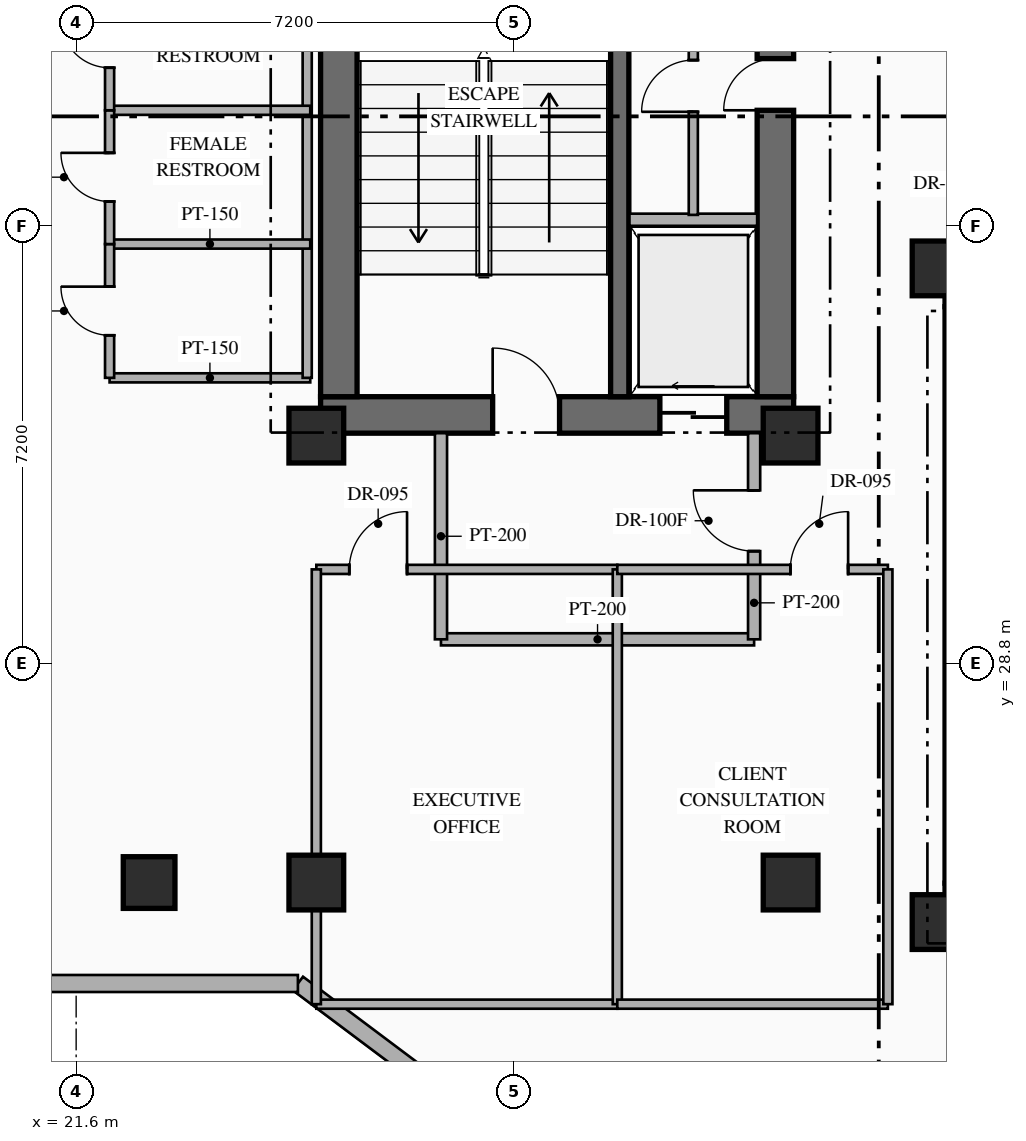
"""IFC4 building model, lengths in metres.
Left out: names, types, materials, properties, quantities, classifications, styles, units other than length and angle.
Written with IfcOpenShell. Run it as: python <this file> out.ifc"""

import sys

from ifc_helpers import new_model, si_unit, direction, frame, frame_2d, origin, origin_2d, place, context, subcontext, project, spatial, rectangle, hollow_rectangle, extrude, element, fill, save


model = new_model("IFC4")
c1 = context("Model", 3, precision=1e-05, world=origin(), true_north=direction((0.0, 1.0)))
c2 = subcontext(c1, "Body", "Model", "MODEL_VIEW")
j1 = project(units=[si_unit("LENGTHUNIT", "METRE"), si_unit("PLANEANGLEUNIT", "RADIAN")], contexts=[c1])
p1 = place(None, origin())
s1 = spatial("IfcSite", under=j1, at=p1, CompositionType="ELEMENT")
p2 = place(p1, origin())
s2 = spatial("IfcBuilding", under=s1, at=p2, CompositionType="ELEMENT")
p3 = place(p2, frame((0.0, 0.0, 119.25)))
s3 = spatial("IfcBuildingStorey", under=s2, at=p3, CompositionType="ELEMENT", Elevation=119.25)
p4 = place(p3, frame((25.62, 32.89, 0.0), z_axis=(0.0, 0.0, 1.0), x_axis=(1.0, 0.0, 0.0)))
e1 = element("IfcWall", 1, at=p4, inside=s3, PredefinedType="SHEAR", context=c2, shape_type="SweptSolid", body=[
    extrude(rectangle(XDim=7.78, YDim=0.6, at=frame_2d((3.89, 0.0))), origin(), (0.0, 0.0, 1.0), 3.6),
])
p5 = place(p4, frame((2.83, 0.0, 0.0)))
e2 = element("IfcOpeningElement", 2, at=p5, cuts=e1, PredefinedType="OPENING", context=c2, shape_type="SweptSolid", body=[
    extrude(rectangle(XDim=1.1, YDim=2.2, at=frame_2d((0.55, 1.1))), frame((0.0, 0.31, 0.0), z_axis=(0.0, -1.0, 0.0), x_axis=(1.0, 0.0, 0.0)), (0.0, 0.0, 1.0), 0.62),
])
p6 = place(p4, frame((5.58, 0.0, 0.0)))
e3 = element("IfcOpeningElement", 3, at=p6, cuts=e1, PredefinedType="OPENING", context=c2, shape_type="SweptSolid", body=[
    extrude(rectangle(XDim=1.1, YDim=2.15, at=frame_2d((0.55, 1.075))), frame((0.0, 0.31, 0.0), z_axis=(0.0, -1.0, 0.0), x_axis=(1.0, 0.0, 0.0)), (0.0, 0.0, 1.0), 0.62),
])
p7 = place(p3, frame((25.92, 33.19, 0.0), z_axis=(0.0, 0.0, 1.0), x_axis=(0.0, 1.0, 0.0)))
e4 = element("IfcWall", 4, at=p7, inside=s3, PredefinedType="SHEAR", context=c2, shape_type="SweptSolid", body=[
    extrude(rectangle(XDim=9.48, YDim=0.6, at=frame_2d((4.74, 0.0))), origin(), (0.0, 0.0, 1.0), 3.6),
])
p8 = place(p3, frame((33.1, 33.19, 0.0), z_axis=(0.0, 0.0, 1.0), x_axis=(0.0, 1.0, 0.0)))
e5 = element("IfcWall", 5, at=p8, inside=s3, PredefinedType="SHEAR", context=c2, shape_type="SweptSolid", body=[
    extrude(rectangle(XDim=9.48, YDim=0.6, at=frame_2d((4.74, 0.0))), origin(), (0.0, 0.0, 1.0), 3.6),
])
p9 = place(p8, frame((4.71, 0.0, 0.0)))
e6 = element("IfcOpeningElement", 6, at=p9, cuts=e5, PredefinedType="OPENING", context=c2, shape_type="SweptSolid", body=[
    extrude(rectangle(XDim=0.85, YDim=2.08, at=frame_2d((0.425, 1.04))), frame((0.0, 0.31, 0.0), z_axis=(0.0, -1.0, 0.0), x_axis=(1.0, 0.0, 0.0)), (0.0, 0.0, 1.0), 0.62),
])
p10 = place(p8, frame((7.76, 0.0, 0.0)))
e7 = element("IfcOpeningElement", 7, at=p10, cuts=e5, PredefinedType="OPENING", context=c2, shape_type="SweptSolid", body=[
    extrude(rectangle(XDim=0.85, YDim=2.08, at=frame_2d((0.425, 1.04))), frame((0.0, 0.31, 0.0), z_axis=(0.0, -1.0, 0.0), x_axis=(1.0, 0.0, 0.0)), (0.0, 0.0, 1.0), 0.62),
])
p11 = place(p3, frame((30.54, 33.19, 0.0), z_axis=(0.0, 0.0, 1.0), x_axis=(0.0, 1.0, 0.0)))
e8 = element("IfcWall", 8, at=p11, inside=s3, PredefinedType="SHEAR", context=c2, shape_type="SweptSolid", body=[
    extrude(rectangle(XDim=9.48, YDim=0.3, at=frame_2d((4.74, 0.0))), origin(), (0.0, 0.0, 1.0), 3.6),
])
p12 = place(p3, frame((35.89, 24.89, 0.0), z_axis=(0.0, 0.0, 1.0), x_axis=(1.0, 0.0, 0.0)))
e9 = element("IfcWall", 9, at=p12, inside=s3, PredefinedType="SHEAR", context=c2, shape_type="SweptSolid", body=[
    extrude(rectangle(XDim=7.76, YDim=0.6, at=frame_2d((3.88, 0.0))), origin(), (0.0, 0.0, 1.0), 3.6),
])
p13 = place(p3, frame((35.89, 34.97, 0.0), z_axis=(0.0, 0.0, 1.0), x_axis=(1.0, 0.0, 0.0)))
e10 = element("IfcWall", 10, at=p13, inside=s3, PredefinedType="SHEAR", context=c2, shape_type="SweptSolid", body=[
    extrude(rectangle(XDim=7.76, YDim=0.6, at=frame_2d((3.88, 0.0))), origin(), (0.0, 0.0, 1.0), 3.6),
])
p14 = place(p13, frame((2.66, 0.0, 0.0)))
e11 = element("IfcOpeningElement", 11, at=p14, cuts=e10, PredefinedType="OPENING", context=c2, shape_type="SweptSolid", body=[
    extrude(rectangle(XDim=1.1, YDim=2.2, at=frame_2d((0.55, 1.1))), frame((0.0, 0.31, 0.0), z_axis=(0.0, -1.0, 0.0), x_axis=(1.0, 0.0, 0.0)), (0.0, 0.0, 1.0), 0.62),
])
p15 = place(p13, frame((5.56, 0.0, 0.0)))
e12 = element("IfcOpeningElement", 12, at=p15, cuts=e10, PredefinedType="OPENING", context=c2, shape_type="SweptSolid", body=[
    extrude(rectangle(XDim=1.12, YDim=2.15, at=frame_2d((0.56, 1.075))), frame((0.0, 0.31, 0.0), z_axis=(0.0, -1.0, 0.0), x_axis=(1.0, 0.0, 0.0)), (0.0, 0.0, 1.0), 0.62),
])
p16 = place(p3, frame((36.19, 25.19, 0.0), z_axis=(0.0, 0.0, 1.0), x_axis=(0.0, 1.0, 0.0)))
e13 = element("IfcWall", 13, at=p16, inside=s3, PredefinedType="SHEAR", context=c2, shape_type="SweptSolid", body=[
    extrude(rectangle(XDim=9.48, YDim=0.6, at=frame_2d((4.74, 0.0))), origin(), (0.0, 0.0, 1.0), 3.6),
])
for number, where, z_axis, x_axis in (
    (14, (25.55, 32.55, 0.0), (0.0, 0.0, 1.0), (1.0, 0.0, 0.0)),
    (15, (33.35, 32.55, 0.0), (0.0, 0.0, 1.0), (1.0, 0.0, 0.0)),
    (16, (35.8, 24.55, 0.0), (0.0, 0.0, 1.0), (1.0, 0.0, 0.0)),
    (17, (35.8, 35.3, 0.0), (0.0, 0.0, 1.0), (1.0, 0.0, 0.0)),
):
    element("IfcColumn", number, at=place(p3, frame(where, z_axis=z_axis, x_axis=x_axis)), inside=s3, PredefinedType="COLUMN", context=c2, shape_type="SweptSolid", body=[
        extrude(rectangle(XDim=0.9, YDim=0.9, at=origin_2d()), origin(), (0.0, 0.0, 1.0), 3.6),
    ])
for number, where, z_axis, x_axis in (
    (18, (25.55, 25.2, 0.0), (0.0, 0.0, 1.0), (1.0, 0.0, 0.0)),
    (19, (33.35, 25.2, 0.0), (0.0, 0.0, 1.0), (1.0, 0.0, 0.0)),
):
    element("IfcColumn", number, at=place(p3, frame(where, z_axis=z_axis, x_axis=x_axis)), inside=s3, PredefinedType="COLUMN", context=c2, shape_type="SweptSolid", body=[
        extrude(hollow_rectangle(XDim=0.9, YDim=0.9, WallThickness=0.036, at=origin_2d()), origin(), (0.0, 0.0, 1.0), 3.6),
    ])
p17 = place(p3, frame((22.8, 25.2, 0.0), z_axis=(0.0, 0.0, 1.0), x_axis=(1.0, 0.0, 0.0)))
e20 = element("IfcColumn", 20, at=p17, inside=s3, PredefinedType="COLUMN", context=c2, shape_type="SweptSolid", body=[
    extrude(hollow_rectangle(XDim=0.85, YDim=0.85, WallThickness=0.032, at=origin_2d()), origin(), (0.0, 0.0, 1.0), 3.6),
])
p18 = place(p3, frame((53.318, 2.487, 0.0), z_axis=(0.0, 0.0, 1.0), x_axis=(-0.800004174678, 0.599994433723, 0.0)))
e21 = element("IfcWall", 21, at=p18, inside=s3, PredefinedType="STANDARD", context=c2, shape_type="SweptSolid", body=[
    extrude(rectangle(XDim=35.089, YDim=0.28, at=frame_2d((17.544, 0.0))), origin(), (0.0, 0.0, 1.0), 3.35),
])
p19 = place(p3, frame((25.247, 23.54, 0.0), z_axis=(0.0, 0.0, 1.0), x_axis=(-1.0, 0.0, 0.0)))
e22 = element("IfcWall", 22, at=p19, inside=s3, PredefinedType="STANDARD", context=c2, shape_type="SweptSolid", body=[
    extrude(rectangle(XDim=6.747, YDim=0.28, at=frame_2d((3.374, 0.0))), origin(), (0.0, 0.0, 1.0), 3.35),
])
p20 = place(p3, frame((30.7, 36.1, 0.0), z_axis=(0.0, 0.0, 1.0), x_axis=(1.0, 0.0, 0.0)))
e23 = element("IfcWall", 23, at=p20, inside=s3, PredefinedType="STANDARD", context=c2, shape_type="SweptSolid", body=[
    extrude(rectangle(XDim=2.1, YDim=0.2, at=frame_2d((1.05, 0.0))), origin(), (0.0, 0.0, 1.0), 3.35),
])
p21 = place(p3, frame((31.75, 36.18, 0.0), z_axis=(0.0, 0.0, 1.0), x_axis=(0.0, 1.0, 0.0)))
e24 = element("IfcWall", 24, at=p21, inside=s3, PredefinedType="PARTITIONING", context=c2, shape_type="SweptSolid", body=[
    extrude(rectangle(XDim=4.24, YDim=0.15, at=frame_2d((2.12, 0.0))), origin(), (0.0, 0.0, 1.0), 3.35),
])
p22 = place(p21, frame((1.695, 0.0, 0.0)))
e25 = element("IfcOpeningElement", 25, at=p22, cuts=e24, PredefinedType="OPENING", context=c2, shape_type="SweptSolid", body=[
    extrude(rectangle(XDim=0.85, YDim=2.08, at=frame_2d((0.425, 1.04))), frame((0.0, 0.085, 0.0), z_axis=(0.0, -1.0, 0.0), x_axis=(1.0, 0.0, 0.0)), (0.0, 0.0, 1.0), 0.17),
])
p23 = place(p3, frame((27.6, 29.2, 0.0), z_axis=(0.0, 0.0, 1.0), x_axis=(1.0, 0.0, 0.0)))
e26 = element("IfcWall", 26, at=p23, inside=s3, PredefinedType="STANDARD", context=c2, shape_type="SweptSolid", body=[
    extrude(rectangle(XDim=5.15, YDim=0.2, at=frame_2d((2.575, 0.0))), origin(), (0.0, 0.0, 1.0), 3.35),
])
p24 = place(p3, frame((27.6, 29.2, 0.0), z_axis=(0.0, 0.0, 1.0), x_axis=(0.0, 1.0, 0.0)))
e27 = element("IfcWall", 27, at=p24, inside=s3, PredefinedType="STANDARD", context=c2, shape_type="SweptSolid", body=[
    extrude(rectangle(XDim=3.39, YDim=0.2, at=frame_2d((1.695, 0.0))), origin(), (0.0, 0.0, 1.0), 3.35),
])
p25 = place(p3, frame((32.75, 29.2, 0.0), z_axis=(0.0, 0.0, 1.0), x_axis=(0.0, 1.0, 0.0)))
e28 = element("IfcWall", 28, at=p25, inside=s3, PredefinedType="STANDARD", context=c2, shape_type="SweptSolid", body=[
    extrude(rectangle(XDim=3.39, YDim=0.2, at=frame_2d((1.695, 0.0))), origin(), (0.0, 0.0, 1.0), 3.35),
])
p26 = place(p25, frame((1.45, 0.0, 0.0)))
e29 = element("IfcOpeningElement", 29, at=p26, cuts=e28, PredefinedType="OPENING", context=c2, shape_type="SweptSolid", body=[
    extrude(rectangle(XDim=1.0, YDim=2.2, at=frame_2d((0.5, 1.1))), frame((0.0, 0.11, 0.0), z_axis=(0.0, -1.0, 0.0), x_axis=(1.0, 0.0, 0.0)), (0.0, 0.0, 1.0), 0.22),
])
p27 = place(p3, frame((22.15, 33.5, 0.0), z_axis=(0.0, 0.0, 1.0), x_axis=(1.0, 0.0, 0.0)))
e30 = element("IfcWall", 30, at=p27, inside=s3, PredefinedType="PARTITIONING", context=c2, shape_type="SweptSolid", body=[
    extrude(rectangle(XDim=3.3, YDim=0.15, at=frame_2d((1.65, 0.0))), origin(), (0.0, 0.0, 1.0), 3.35),
])
p28 = place(p3, frame((25.4, 33.5, 0.0), z_axis=(0.0, 0.0, 1.0), x_axis=(0.0, 1.0, 0.0)))
e31 = element("IfcWall", 31, at=p28, inside=s3, PredefinedType="PARTITIONING", context=c2, shape_type="SweptSolid", body=[
    extrude(rectangle(XDim=6.6, YDim=0.15, at=frame_2d((3.3, 0.0))), origin(), (0.0, 0.0, 1.0), 3.35),
])
for number, where, z_axis, x_axis in (
    (32, (22.15, 35.7, 0.0), (0.0, 0.0, 1.0), (1.0, 0.0, 0.0)),
    (33, (22.15, 37.9, 0.0), (0.0, 0.0, 1.0), (1.0, 0.0, 0.0)),
):
    element("IfcWall", number, at=place(p3, frame(where, z_axis=z_axis, x_axis=x_axis)), inside=s3, PredefinedType="PARTITIONING", context=c2, shape_type="SweptSolid", body=[
        extrude(rectangle(XDim=3.3, YDim=0.15, at=frame_2d((1.65, 0.0))), origin(), (0.0, 0.0, 1.0), 3.35),
    ])
p29 = place(p3, frame((22.15, 33.5, 0.0), z_axis=(0.0, 0.0, 1.0), x_axis=(0.0, 1.0, 0.0)))
e34 = element("IfcWall", 34, at=p29, inside=s3, PredefinedType="PARTITIONING", context=c2, shape_type="SweptSolid", body=[
    extrude(rectangle(XDim=2.2, YDim=0.15, at=frame_2d((1.1, 0.0))), origin(), (0.0, 0.0, 1.0), 3.35),
])
p30 = place(p29, frame((0.7, 0.0, 0.0)))
e35 = element("IfcOpeningElement", 35, at=p30, cuts=e34, PredefinedType="OPENING", context=c2, shape_type="SweptSolid", body=[
    extrude(rectangle(XDim=0.8, YDim=2.06, at=frame_2d((0.4, 1.03))), frame((0.0, 0.085, 0.0), z_axis=(0.0, -1.0, 0.0), x_axis=(1.0, 0.0, 0.0)), (0.0, 0.0, 1.0), 0.17),
])
p31 = place(p3, frame((22.15, 35.7, 0.0), z_axis=(0.0, 0.0, 1.0), x_axis=(0.0, 1.0, 0.0)))
e36 = element("IfcWall", 36, at=p31, inside=s3, PredefinedType="PARTITIONING", context=c2, shape_type="SweptSolid", body=[
    extrude(rectangle(XDim=2.2, YDim=0.15, at=frame_2d((1.1, 0.0))), origin(), (0.0, 0.0, 1.0), 3.35),
])
p32 = place(p31, frame((0.7, 0.0, 0.0)))
e37 = element("IfcOpeningElement", 37, at=p32, cuts=e36, PredefinedType="OPENING", context=c2, shape_type="SweptSolid", body=[
    extrude(rectangle(XDim=0.8, YDim=2.06, at=frame_2d((0.4, 1.03))), frame((0.0, 0.085, 0.0), z_axis=(0.0, -1.0, 0.0), x_axis=(1.0, 0.0, 0.0)), (0.0, 0.0, 1.0), 0.17),
])
p33 = place(p3, frame((22.15, 37.9, 0.0), z_axis=(0.0, 0.0, 1.0), x_axis=(0.0, 1.0, 0.0)))
e38 = element("IfcWall", 38, at=p33, inside=s3, PredefinedType="PARTITIONING", context=c2, shape_type="SweptSolid", body=[
    extrude(rectangle(XDim=2.2, YDim=0.15, at=frame_2d((1.1, 0.0))), origin(), (0.0, 0.0, 1.0), 3.35),
])
p34 = place(p33, frame((0.7, 0.0, 0.0)))
e39 = element("IfcOpeningElement", 39, at=p34, cuts=e38, PredefinedType="OPENING", context=c2, shape_type="SweptSolid", body=[
    extrude(rectangle(XDim=0.8, YDim=2.06, at=frame_2d((0.4, 1.03))), frame((0.0, 0.085, 0.0), z_axis=(0.0, -1.0, 0.0), x_axis=(1.0, 0.0, 0.0)), (0.0, 0.0, 1.0), 0.17),
])
p35 = place(p3, frame((25.55, 23.2, 0.0), z_axis=(0.0, 0.0, 1.0), x_axis=(1.0, 0.0, 0.0)))
e40 = element("IfcWall", 40, at=p35, inside=s3, PredefinedType="PARTITIONING", context=c2, shape_type="SweptSolid", body=[
    extrude(rectangle(XDim=4.95, YDim=0.15, at=frame_2d((2.475, 0.0))), origin(), (0.0, 0.0, 1.0), 3.35),
])
p36 = place(p3, frame((25.55, 30.35, 0.0), z_axis=(0.0, 0.0, 1.0), x_axis=(1.0, 0.0, 0.0)))
e41 = element("IfcWall", 41, at=p36, inside=s3, PredefinedType="PARTITIONING", context=c2, shape_type="SweptSolid", body=[
    extrude(rectangle(XDim=4.95, YDim=0.15, at=frame_2d((2.475, 0.0))), origin(), (0.0, 0.0, 1.0), 3.35),
])
p37 = place(p36, frame((0.542, 0.0, 0.0)))
e42 = element("IfcOpeningElement", 42, at=p37, cuts=e41, PredefinedType="OPENING", context=c2, shape_type="SweptSolid", body=[
    extrude(rectangle(XDim=0.95, YDim=2.15, at=frame_2d((0.475, 1.075))), frame((0.0, 0.085, 0.0), z_axis=(0.0, -1.0, 0.0), x_axis=(1.0, 0.0, 0.0)), (0.0, 0.0, 1.0), 0.17),
])
p38 = place(p3, frame((25.55, 23.2, 0.0), z_axis=(0.0, 0.0, 1.0), x_axis=(0.0, 1.0, 0.0)))
e43 = element("IfcWall", 43, at=p38, inside=s3, PredefinedType="PARTITIONING", context=c2, shape_type="SweptSolid", body=[
    extrude(rectangle(XDim=7.15, YDim=0.15, at=frame_2d((3.575, 0.0))), origin(), (0.0, 0.0, 1.0), 2.695),
])
p39 = place(p3, frame((30.5, 23.2, 0.0), z_axis=(0.0, 0.0, 1.0), x_axis=(0.0, 1.0, 0.0)))
e44 = element("IfcWall", 44, at=p39, inside=s3, PredefinedType="PARTITIONING", context=c2, shape_type="SweptSolid", body=[
    extrude(rectangle(XDim=7.15, YDim=0.15, at=frame_2d((3.575, 0.0))), origin(), (0.0, 0.0, 1.0), 3.35),
])
p40 = place(p3, frame((30.5, 23.2, 0.0), z_axis=(0.0, 0.0, 1.0), x_axis=(1.0, 0.0, 0.0)))
e45 = element("IfcWall", 45, at=p40, inside=s3, PredefinedType="PARTITIONING", context=c2, shape_type="SweptSolid", body=[
    extrude(rectangle(XDim=4.45, YDim=0.15, at=frame_2d((2.225, 0.0))), origin(), (0.0, 0.0, 1.0), 3.35),
])
p41 = place(p3, frame((30.5, 30.35, 0.0), z_axis=(0.0, 0.0, 1.0), x_axis=(1.0, 0.0, 0.0)))
e46 = element("IfcWall", 46, at=p41, inside=s3, PredefinedType="PARTITIONING", context=c2, shape_type="SweptSolid", body=[
    extrude(rectangle(XDim=4.45, YDim=0.15, at=frame_2d((2.225, 0.0))), origin(), (0.0, 0.0, 1.0), 3.35),
])
p42 = place(p41, frame((2.846, 0.0, 0.0)))
e47 = element("IfcOpeningElement", 47, at=p42, cuts=e46, PredefinedType="OPENING", context=c2, shape_type="SweptSolid", body=[
    extrude(rectangle(XDim=0.95, YDim=2.15, at=frame_2d((0.475, 1.075))), frame((0.0, 0.085, 0.0), z_axis=(0.0, -1.0, 0.0), x_axis=(1.0, 0.0, 0.0)), (0.0, 0.0, 1.0), 0.17),
])
p43 = place(p3, frame((34.95, 23.2, 0.0), z_axis=(0.0, 0.0, 1.0), x_axis=(0.0, 1.0, 0.0)))
e48 = element("IfcWall", 48, at=p43, inside=s3, PredefinedType="PARTITIONING", context=c2, shape_type="SweptSolid", body=[
    extrude(rectangle(XDim=7.15, YDim=0.15, at=frame_2d((3.575, 0.0))), origin(), (0.0, 0.0, 1.0), 3.35),
])
p44 = place(p5, origin())
e49 = element("IfcDoor", 49, at=p44, inside=s3, OperationType="SINGLE_SWING_LEFT", PredefinedType="DOOR", context=c2, shape_type="SweptSolid", body=[
    extrude(rectangle(XDim=1.1, YDim=2.2, at=frame_2d((0.55, 1.1))), frame((0.0, 0.025, 0.0), z_axis=(0.0, -1.0, 0.0), x_axis=(1.0, 0.0, 0.0)), (0.0, 0.0, 1.0), 0.05),
])
fill(e2, e49)
p45 = place(p6, origin())
e50 = element("IfcDoor", 50, at=p45, inside=s3, OperationType="SLIDING_TO_LEFT", PredefinedType="USERDEFINED", context=c2, shape_type="SweptSolid", body=[
    extrude(rectangle(XDim=1.1, YDim=2.15, at=frame_2d((0.55, 1.075))), frame((0.0, 0.025, 0.0), z_axis=(0.0, -1.0, 0.0), x_axis=(1.0, 0.0, 0.0)), (0.0, 0.0, 1.0), 0.05),
])
fill(e3, e50)
p46 = place(p9, origin())
e51 = element("IfcDoor", 51, at=p46, inside=s3, OperationType="SINGLE_SWING_LEFT", PredefinedType="DOOR", context=c2, shape_type="SweptSolid", body=[
    extrude(rectangle(XDim=0.85, YDim=2.08, at=frame_2d((0.425, 1.04))), frame((0.0, 0.025, 0.0), z_axis=(0.0, -1.0, 0.0), x_axis=(1.0, 0.0, 0.0)), (0.0, 0.0, 1.0), 0.05),
])
fill(e6, e51)
p47 = place(p22, origin())
e52 = element("IfcDoor", 52, at=p47, inside=s3, OperationType="SINGLE_SWING_LEFT", PredefinedType="DOOR", context=c2, shape_type="SweptSolid", body=[
    extrude(rectangle(XDim=0.85, YDim=2.08, at=frame_2d((0.425, 1.04))), frame((0.0, 0.025, 0.0), z_axis=(0.0, -1.0, 0.0), x_axis=(1.0, 0.0, 0.0)), (0.0, 0.0, 1.0), 0.05),
])
fill(e25, e52)
p48 = place(p26, origin())
e53 = element("IfcDoor", 53, at=p48, inside=s3, OperationType="SINGLE_SWING_RIGHT", PredefinedType="DOOR", context=c2, shape_type="SweptSolid", body=[
    extrude(rectangle(XDim=1.0, YDim=2.2, at=frame_2d((0.5, 1.1))), frame((0.0, 0.025, 0.0), z_axis=(0.0, -1.0, 0.0), x_axis=(1.0, 0.0, 0.0)), (0.0, 0.0, 1.0), 0.05),
])
fill(e29, e53)
p49 = place(p30, origin())
e54 = element("IfcDoor", 54, at=p49, inside=s3, OperationType="SINGLE_SWING_RIGHT", PredefinedType="DOOR", context=c2, shape_type="SweptSolid", body=[
    extrude(rectangle(XDim=0.8, YDim=2.06, at=frame_2d((0.4, 1.03))), frame((0.0, 0.025, 0.0), z_axis=(0.0, -1.0, 0.0), x_axis=(1.0, 0.0, 0.0)), (0.0, 0.0, 1.0), 0.05),
])
fill(e35, e54)
p50 = place(p32, origin())
e55 = element("IfcDoor", 55, at=p50, inside=s3, OperationType="SINGLE_SWING_RIGHT", PredefinedType="DOOR", context=c2, shape_type="SweptSolid", body=[
    extrude(rectangle(XDim=0.8, YDim=2.06, at=frame_2d((0.4, 1.03))), frame((0.0, 0.025, 0.0), z_axis=(0.0, -1.0, 0.0), x_axis=(1.0, 0.0, 0.0)), (0.0, 0.0, 1.0), 0.05),
])
fill(e37, e55)
p51 = place(p34, origin())
e56 = element("IfcDoor", 56, at=p51, inside=s3, OperationType="SINGLE_SWING_RIGHT", PredefinedType="DOOR", context=c2, shape_type="SweptSolid", body=[
    extrude(rectangle(XDim=0.8, YDim=2.06, at=frame_2d((0.4, 1.03))), frame((0.0, 0.025, 0.0), z_axis=(0.0, -1.0, 0.0), x_axis=(1.0, 0.0, 0.0)), (0.0, 0.0, 1.0), 0.05),
])
fill(e39, e56)
p52 = place(p37, origin())
e57 = element("IfcDoor", 57, at=p52, inside=s3, OperationType="SINGLE_SWING_RIGHT", PredefinedType="DOOR", context=c2, shape_type="SweptSolid", body=[
    extrude(rectangle(XDim=0.95, YDim=2.15, at=frame_2d((0.475, 1.075))), frame((0.0, 0.025, 0.0), z_axis=(0.0, -1.0, 0.0), x_axis=(1.0, 0.0, 0.0)), (0.0, 0.0, 1.0), 0.05),
])
fill(e42, e57)
p53 = place(p42, origin())
e58 = element("IfcDoor", 58, at=p53, inside=s3, OperationType="SINGLE_SWING_RIGHT", PredefinedType="DOOR", context=c2, shape_type="SweptSolid", body=[
    extrude(rectangle(XDim=0.95, YDim=2.15, at=frame_2d((0.475, 1.075))), frame((0.0, 0.025, 0.0), z_axis=(0.0, -1.0, 0.0), x_axis=(1.0, 0.0, 0.0)), (0.0, 0.0, 1.0), 0.05),
])
fill(e47, e58)
save(model, sys.argv[1])
